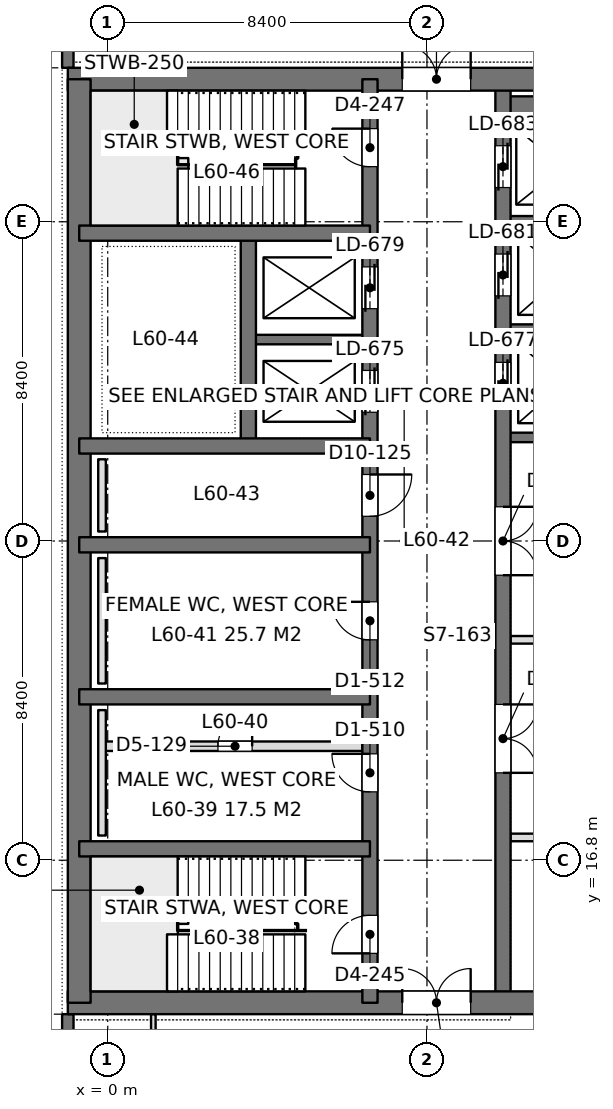
"""IFC4 building model, lengths in metres.
Left out: names, types, materials, properties, quantities, classifications, styles, units other than length and angle.
Written with IfcOpenShell. Run it as: python <this file> out.ifc"""

import sys

from ifc_helpers import new_model, si_unit, direction, frame, frame_2d, origin, place, context, subcontext, project, spatial, rectangle, extrude, element, fill, save


model = new_model("IFC4")
c1 = context("Model", 3, precision=1e-05, world=origin(), true_north=direction((0.0, 1.0)))
c2 = subcontext(c1, "Body", "Model", "MODEL_VIEW")
j1 = project(units=[si_unit("LENGTHUNIT", "METRE"), si_unit("PLANEANGLEUNIT", "RADIAN")], contexts=[c1])
p1 = place(None, origin())
s1 = spatial("IfcSite", under=j1, at=p1, CompositionType="ELEMENT")
p2 = place(p1, origin())
s2 = spatial("IfcBuilding", under=s1, at=p2, CompositionType="ELEMENT")
p3 = place(p2, frame((0.0, 0.0, 263.7)))
s3 = spatial("IfcBuildingStorey", under=s2, at=p3, CompositionType="ELEMENT", Elevation=263.7)
p4 = place(p3, frame((-1.05, 13.05, 0.0), z_axis=(0.0, 0.0, 1.0), x_axis=(1.0, 0.0, 0.0)))
e1 = element("IfcWall", 1, at=p4, inside=s3, PredefinedType="SHEAR", context=c2, shape_type="SweptSolid", body=[
    extrude(rectangle(XDim=17.7, YDim=0.6, at=frame_2d((8.85, 0.0))), origin(), (0.0, 0.0, 1.0), 4.5),
])
p5 = place(p4, frame((8.8, 0.0, 0.0)))
e2 = element("IfcOpeningElement", 2, at=p5, cuts=e1, PredefinedType="OPENING", context=c2, shape_type="SweptSolid", body=[
    extrude(rectangle(XDim=1.8, YDim=2.4, at=frame_2d((0.9, 1.2))), frame((0.0, 0.31, 0.0), z_axis=(0.0, -1.0, 0.0), x_axis=(1.0, 0.0, 0.0)), (0.0, 0.0, 1.0), 0.62),
])
p6 = place(p3, frame((-1.05, 37.35, 0.0), z_axis=(0.0, 0.0, 1.0), x_axis=(1.0, 0.0, 0.0)))
e3 = element("IfcWall", 3, at=p6, inside=s3, PredefinedType="SHEAR", context=c2, shape_type="SweptSolid", body=[
    extrude(rectangle(XDim=17.7, YDim=0.6, at=frame_2d((8.85, 0.0))), origin(), (0.0, 0.0, 1.0), 4.5),
])
p7 = place(p6, frame((8.8, 0.0, 0.0)))
e4 = element("IfcOpeningElement", 4, at=p7, cuts=e3, PredefinedType="OPENING", context=c2, shape_type="SweptSolid", body=[
    extrude(rectangle(XDim=1.8, YDim=2.4, at=frame_2d((0.9, 1.2))), frame((0.0, 0.31, 0.0), z_axis=(0.0, -1.0, 0.0), x_axis=(1.0, 0.0, 0.0)), (0.0, 0.0, 1.0), 0.62),
])
p8 = place(p3, frame((-0.75, 13.05, 0.0), z_axis=(0.0, 0.0, 1.0), x_axis=(0.0, 1.0, 0.0)))
e5 = element("IfcWall", 5, at=p8, inside=s3, PredefinedType="SHEAR", context=c2, shape_type="SweptSolid", body=[
    extrude(rectangle(XDim=24.3, YDim=0.6, at=frame_2d((12.15, 0.0))), origin(), (0.0, 0.0, 1.0), 4.5),
])
p9 = place(p3, frame((6.9, 13.05, 0.0), z_axis=(0.0, 0.0, 1.0), x_axis=(0.0, 1.0, 0.0)))
e6 = element("IfcWall", 6, at=p9, inside=s3, PredefinedType="SHEAR", context=c2, shape_type="SweptSolid", body=[
    extrude(rectangle(XDim=24.3, YDim=0.4, at=frame_2d((12.15, 0.0))), origin(), (0.0, 0.0, 1.0), 4.5),
])
p10 = place(p9, frame((1.3, 0.0, 0.0)))
e7 = element("IfcOpeningElement", 7, at=p10, cuts=e6, PredefinedType="OPENING", context=c2, shape_type="SweptSolid", body=[
    extrude(rectangle(XDim=1.0, YDim=2.2, at=frame_2d((0.5, 1.1))), frame((0.0, 0.21, 0.0), z_axis=(0.0, -1.0, 0.0), x_axis=(1.0, 0.0, 0.0)), (0.0, 0.0, 1.0), 0.42),
])
p11 = place(p9, frame((22.0, 0.0, 0.0)))
e8 = element("IfcOpeningElement", 8, at=p11, cuts=e6, PredefinedType="OPENING", context=c2, shape_type="SweptSolid", body=[
    extrude(rectangle(XDim=1.0, YDim=2.2, at=frame_2d((0.5, 1.1))), frame((0.0, 0.21, 0.0), z_axis=(0.0, -1.0, 0.0), x_axis=(1.0, 0.0, 0.0)), (0.0, 0.0, 1.0), 0.42),
])
p12 = place(p9, frame((5.55, 0.0, 0.0)))
e9 = element("IfcOpeningElement", 9, at=p12, cuts=e6, PredefinedType="OPENING", context=c2, shape_type="SweptSolid", body=[
    extrude(rectangle(XDim=1.0, YDim=2.2, at=frame_2d((0.5, 1.1))), frame((0.0, 0.21, 0.0), z_axis=(0.0, -1.0, 0.0), x_axis=(1.0, 0.0, 0.0)), (0.0, 0.0, 1.0), 0.42),
])
p13 = place(p9, frame((9.55, 0.0, 0.0)))
e10 = element("IfcOpeningElement", 10, at=p13, cuts=e6, PredefinedType="OPENING", context=c2, shape_type="SweptSolid", body=[
    extrude(rectangle(XDim=1.0, YDim=2.2, at=frame_2d((0.5, 1.1))), frame((0.0, 0.21, 0.0), z_axis=(0.0, -1.0, 0.0), x_axis=(1.0, 0.0, 0.0)), (0.0, 0.0, 1.0), 0.42),
])
p14 = place(p9, frame((12.8, 0.0, 0.0)))
e11 = element("IfcOpeningElement", 11, at=p14, cuts=e6, PredefinedType="OPENING", context=c2, shape_type="SweptSolid", body=[
    extrude(rectangle(XDim=1.1, YDim=2.2, at=frame_2d((0.55, 1.1))), frame((0.0, 0.21, 0.0), z_axis=(0.0, -1.0, 0.0), x_axis=(1.0, 0.0, 0.0)), (0.0, 0.0, 1.0), 0.42),
])
p15 = place(p9, frame((15.538, 0.0, 0.0)))
e12 = element("IfcOpeningElement", 12, at=p15, cuts=e6, PredefinedType="OPENING", context=c2, shape_type="SweptSolid", body=[
    extrude(rectangle(XDim=1.1, YDim=2.2, at=frame_2d((0.55, 1.1))), frame((0.0, 0.21, 0.0), z_axis=(0.0, -1.0, 0.0), x_axis=(1.0, 0.0, 0.0)), (0.0, 0.0, 1.0), 0.42),
])
p16 = place(p9, frame((18.262, 0.0, 0.0)))
e13 = element("IfcOpeningElement", 13, at=p16, cuts=e6, PredefinedType="OPENING", context=c2, shape_type="SweptSolid", body=[
    extrude(rectangle(XDim=1.1, YDim=2.2, at=frame_2d((0.55, 1.1))), frame((0.0, 0.21, 0.0), z_axis=(0.0, -1.0, 0.0), x_axis=(1.0, 0.0, 0.0)), (0.0, 0.0, 1.0), 0.42),
])
p17 = place(p3, frame((10.4, 13.05, 0.0), z_axis=(0.0, 0.0, 1.0), x_axis=(0.0, 1.0, 0.0)))
e14 = element("IfcWall", 14, at=p17, inside=s3, PredefinedType="SHEAR", context=c2, shape_type="SweptSolid", body=[
    extrude(rectangle(XDim=24.3, YDim=0.4, at=frame_2d((12.15, 0.0))), origin(), (0.0, 0.0, 1.0), 4.5),
])
p18 = place(p17, frame((15.75, 0.0, 0.0)))
e15 = element("IfcOpeningElement", 15, at=p18, cuts=e14, PredefinedType="OPENING", context=c2, shape_type="SweptSolid", body=[
    extrude(rectangle(XDim=1.1, YDim=2.2, at=frame_2d((0.55, 1.1))), frame((0.0, 0.21, 0.0), z_axis=(0.0, -1.0, 0.0), x_axis=(1.0, 0.0, 0.0)), (0.0, 0.0, 1.0), 0.42),
])
p19 = place(p17, frame((18.6, 0.0, 0.0)))
e16 = element("IfcOpeningElement", 16, at=p19, cuts=e14, PredefinedType="OPENING", context=c2, shape_type="SweptSolid", body=[
    extrude(rectangle(XDim=1.1, YDim=2.2, at=frame_2d((0.55, 1.1))), frame((0.0, 0.21, 0.0), z_axis=(0.0, -1.0, 0.0), x_axis=(1.0, 0.0, 0.0)), (0.0, 0.0, 1.0), 0.42),
])
p20 = place(p17, frame((21.45, 0.0, 0.0)))
e17 = element("IfcOpeningElement", 17, at=p20, cuts=e14, PredefinedType="OPENING", context=c2, shape_type="SweptSolid", body=[
    extrude(rectangle(XDim=1.1, YDim=2.2, at=frame_2d((0.55, 1.1))), frame((0.0, 0.21, 0.0), z_axis=(0.0, -1.0, 0.0), x_axis=(1.0, 0.0, 0.0)), (0.0, 0.0, 1.0), 0.42),
])
p21 = place(p17, frame((6.05, 0.0, 0.0)))
e18 = element("IfcOpeningElement", 18, at=p21, cuts=e14, PredefinedType="OPENING", context=c2, shape_type="SweptSolid", body=[
    extrude(rectangle(XDim=1.8, YDim=2.4, at=frame_2d((0.9, 1.2))), frame((0.0, 0.21, 0.0), z_axis=(0.0, -1.0, 0.0), x_axis=(1.0, 0.0, 0.0)), (0.0, 0.0, 1.0), 0.42),
])
p22 = place(p17, frame((11.25, 0.0, 0.0)))
e19 = element("IfcOpeningElement", 19, at=p22, cuts=e14, PredefinedType="OPENING", context=c2, shape_type="SweptSolid", body=[
    extrude(rectangle(XDim=1.8, YDim=2.4, at=frame_2d((0.9, 1.2))), frame((0.0, 0.21, 0.0), z_axis=(0.0, -1.0, 0.0), x_axis=(1.0, 0.0, 0.0)), (0.0, 0.0, 1.0), 0.42),
])
for number, where, z_axis, x_axis in (
    (20, (-0.75, 17.1, 0.0), (0.0, 0.0, 1.0), (1.0, 0.0, 0.0)),
    (21, (-0.75, 21.1, 0.0), (0.0, 0.0, 1.0), (1.0, 0.0, 0.0)),
    (22, (-0.75, 25.1, 0.0), (0.0, 0.0, 1.0), (1.0, 0.0, 0.0)),
    (23, (-0.75, 27.7, 0.0), (0.0, 0.0, 1.0), (1.0, 0.0, 0.0)),
    (24, (-0.75, 33.3, 0.0), (0.0, 0.0, 1.0), (1.0, 0.0, 0.0)),
):
    element("IfcWall", number, at=place(p3, frame(where, z_axis=z_axis, x_axis=x_axis)), inside=s3, PredefinedType="SHEAR", context=c2, shape_type="SweptSolid", body=[
        extrude(rectangle(XDim=7.65, YDim=0.4, at=frame_2d((3.825, 0.0))), origin(), (0.0, 0.0, 1.0), 4.5),
    ])
p23 = place(p3, frame((3.7, 27.7, 0.0), z_axis=(0.0, 0.0, 1.0), x_axis=(0.0, 1.0, 0.0)))
e25 = element("IfcWall", 25, at=p23, inside=s3, PredefinedType="SHEAR", context=c2, shape_type="SweptSolid", body=[
    extrude(rectangle(XDim=5.6, YDim=0.4, at=frame_2d((2.8, 0.0))), origin(), (0.0, 0.0, 1.0), 4.5),
])
p24 = place(p3, frame((3.7, 30.5, 0.0), z_axis=(0.0, 0.0, 1.0), x_axis=(1.0, 0.0, 0.0)))
e26 = element("IfcWall", 26, at=p24, inside=s3, PredefinedType="SHEAR", context=c2, shape_type="SweptSolid", body=[
    extrude(rectangle(XDim=3.2, YDim=0.25, at=frame_2d((1.6, 0.0))), origin(), (0.0, 0.0, 1.0), 4.5),
])
p25 = place(p3, frame((10.4, 27.925, 0.0), z_axis=(0.0, 0.0, 1.0), x_axis=(1.0, 0.0, 0.0)))
e27 = element("IfcWall", 27, at=p25, inside=s3, PredefinedType="SHEAR", context=c2, shape_type="SweptSolid", body=[
    extrude(rectangle(XDim=5.95, YDim=0.25, at=frame_2d((2.975, 0.0))), origin(), (0.0, 0.0, 1.0), 4.5),
])
for number, where, z_axis, x_axis in (
    (28, (10.4, 30.775, 0.0), (0.0, 0.0, 1.0), (1.0, 0.0, 0.0)),
    (29, (10.4, 33.625, 0.0), (0.0, 0.0, 1.0), (1.0, 0.0, 0.0)),
):
    element("IfcWall", number, at=place(p3, frame(where, z_axis=z_axis, x_axis=x_axis)), inside=s3, PredefinedType="SHEAR", context=c2, shape_type="SweptSolid", body=[
        extrude(rectangle(XDim=3.2, YDim=0.25, at=frame_2d((1.6, 0.0))), origin(), (0.0, 0.0, 1.0), 4.5),
    ])
p26 = place(p3, frame((10.4, 36.625, 0.0), z_axis=(0.0, 0.0, 1.0), x_axis=(1.0, 0.0, 0.0)))
e30 = element("IfcWall", 30, at=p26, inside=s3, PredefinedType="SHEAR", context=c2, shape_type="SweptSolid", body=[
    extrude(rectangle(XDim=3.2, YDim=0.55, at=frame_2d((1.6, 0.0))), origin(), (0.0, 0.0, 1.0), 4.5),
])
p27 = place(p3, frame((-1.05, 8.4, 0.0), z_axis=(0.0, 0.0, 1.0), x_axis=(0.0, 1.0, 0.0)))
e31 = element("IfcWall", 31, at=p27, inside=s3, PredefinedType="SOLIDWALL", context=c2, shape_type="SweptSolid", body=[
    extrude(rectangle(XDim=4.35, YDim=0.3, at=frame_2d((2.175, 0.0))), origin(), (0.0, 0.0, 1.0), 4.35),
])
p28 = place(p27, frame((0.975, 0.0, 0.9)))
e32 = element("IfcOpeningElement", 32, at=p28, cuts=e31, PredefinedType="OPENING", context=c2, shape_type="SweptSolid", body=[
    extrude(rectangle(XDim=2.4, YDim=1.9, at=frame_2d((1.2, 0.95))), frame((0.0, 0.16, 0.0), z_axis=(0.0, -1.0, 0.0), x_axis=(1.0, 0.0, 0.0)), (0.0, 0.0, 1.0), 0.32),
])
p29 = place(p3, frame((-1.05, 37.65, 0.0), z_axis=(0.0, 0.0, 1.0), x_axis=(0.0, 1.0, 0.0)))
e33 = element("IfcWall", 33, at=p29, inside=s3, PredefinedType="SOLIDWALL", context=c2, shape_type="SweptSolid", body=[
    extrude(rectangle(XDim=4.35, YDim=0.3, at=frame_2d((2.175, 0.0))), origin(), (0.0, 0.0, 1.0), 4.35),
])
p30 = place(p29, frame((0.975, 0.0, 0.9)))
e34 = element("IfcOpeningElement", 34, at=p30, cuts=e33, PredefinedType="OPENING", context=c2, shape_type="SweptSolid", body=[
    extrude(rectangle(XDim=2.4, YDim=1.9, at=frame_2d((1.2, 0.95))), frame((0.0, 0.16, 0.0), z_axis=(0.0, -1.0, 0.0), x_axis=(1.0, 0.0, 0.0)), (0.0, 0.0, 1.0), 0.32),
])
p31 = place(p3, frame((10.598, 17.4, 0.0), z_axis=(0.0, 0.0, 1.0), x_axis=(1.0, 0.0, 0.0)))
e35 = element("IfcWall", 35, at=p31, inside=s3, PredefinedType="PARTITIONING", context=c2, shape_type="SweptSolid", body=[
    extrude(rectangle(XDim=5.904, YDim=0.2, at=frame_2d((2.952, 0.0))), origin(), (0.0, 0.0, 1.0), 3.8),
])
p32 = place(p3, frame((10.598, 22.6, 0.0), z_axis=(0.0, 0.0, 1.0), x_axis=(1.0, 0.0, 0.0)))
e36 = element("IfcWall", 36, at=p32, inside=s3, PredefinedType="PARTITIONING", context=c2, shape_type="SweptSolid", body=[
    extrude(rectangle(XDim=5.053, YDim=0.2, at=frame_2d((2.526, 0.0))), origin(), (0.0, 0.0, 1.0), 4.35),
])
for number, where, z_axis, x_axis in (
    (37, (1.2, 10.4, 0.0), (0.0, 0.0, 1.0), (0.0, 1.0, 0.0)),
    (38, (1.2, 37.648, 0.0), (0.0, 0.0, 1.0), (0.0, 1.0, 0.0)),
):
    element("IfcWall", number, at=place(p3, frame(where, z_axis=z_axis, x_axis=x_axis)), inside=s3, PredefinedType="PARTITIONING", context=c2, shape_type="SweptSolid", body=[
        extrude(rectangle(XDim=2.352, YDim=0.12, at=frame_2d((1.176, 0.0))), origin(), (0.0, 0.0, 1.0), 4.35),
    ])
p33 = place(p3, frame((-0.05, 19.8, 0.0), z_axis=(0.0, 0.0, 1.0), x_axis=(1.0, 0.0, 0.0)))
e39 = element("IfcWall", 39, at=p33, inside=s3, PredefinedType="PARTITIONING", context=c2, shape_type="SweptSolid", body=[
    extrude(rectangle(XDim=6.75, YDim=0.25, at=frame_2d((3.375, 0.0))), origin(), (0.0, 0.0, 1.0), 4.3),
])
p34 = place(p33, frame((2.95, 0.0, 0.0)))
e40 = element("IfcOpeningElement", 40, at=p34, cuts=e39, PredefinedType="OPENING", context=c2, shape_type="SweptSolid", body=[
    extrude(rectangle(XDim=0.9, YDim=2.2, at=frame_2d((0.45, 1.1))), frame((0.0, 0.135, 0.0), z_axis=(0.0, -1.0, 0.0), x_axis=(1.0, 0.0, 0.0)), (0.0, 0.0, 1.0), 0.27),
])
for number, where, z_axis, x_axis in (
    (41, (-0.15, 17.45, 0.0), (0.0, 0.0, 1.0), (0.0, 1.0, 0.0)),
    (42, (-0.15, 21.45, 0.0), (0.0, 0.0, 1.0), (0.0, 1.0, 0.0)),
):
    element("IfcWall", number, at=place(p3, frame(where, z_axis=z_axis, x_axis=x_axis)), inside=s3, PredefinedType="PLUMBINGWALL", context=c2, shape_type="SweptSolid", body=[
        extrude(rectangle(XDim=3.3, YDim=0.2, at=frame_2d((1.65, 0.0))), origin(), (0.0, 0.0, 1.0), 1.2),
    ])
p35 = place(p3, frame((-0.15, 25.45, 0.0), z_axis=(0.0, 0.0, 1.0), x_axis=(0.0, 1.0, 0.0)))
e43 = element("IfcWall", 43, at=p35, inside=s3, PredefinedType="PLUMBINGWALL", context=c2, shape_type="SweptSolid", body=[
    extrude(rectangle(XDim=1.9, YDim=0.2, at=frame_2d((0.95, 0.0))), origin(), (0.0, 0.0, 1.0), 1.2),
])
p36 = place(p5, origin())
e44 = element("IfcDoor", 44, at=p36, inside=s3, OperationType="DOUBLE_DOOR_SINGLE_SWING", PredefinedType="DOOR", context=c2, shape_type="SweptSolid", body=[
    extrude(rectangle(XDim=1.8, YDim=2.4, at=frame_2d((0.9, 1.2))), frame((0.0, 0.025, 0.0), z_axis=(0.0, -1.0, 0.0), x_axis=(1.0, 0.0, 0.0)), (0.0, 0.0, 1.0), 0.05),
])
fill(e2, e44)
p37 = place(p7, origin())
e45 = element("IfcDoor", 45, at=p37, inside=s3, OperationType="DOUBLE_DOOR_SINGLE_SWING", PredefinedType="DOOR", context=c2, shape_type="SweptSolid", body=[
    extrude(rectangle(XDim=1.8, YDim=2.4, at=frame_2d((0.9, 1.2))), frame((0.0, 0.025, 0.0), z_axis=(0.0, -1.0, 0.0), x_axis=(1.0, 0.0, 0.0)), (0.0, 0.0, 1.0), 0.05),
])
fill(e4, e45)
p38 = place(p10, origin())
e46 = element("IfcDoor", 46, at=p38, inside=s3, OperationType="SINGLE_SWING_LEFT", PredefinedType="DOOR", context=c2, shape_type="SweptSolid", body=[
    extrude(rectangle(XDim=1.0, YDim=2.2, at=frame_2d((0.5, 1.1))), frame((0.0, 0.025, 0.0), z_axis=(0.0, -1.0, 0.0), x_axis=(1.0, 0.0, 0.0)), (0.0, 0.0, 1.0), 0.05),
])
fill(e7, e46)
p39 = place(p11, origin())
e47 = element("IfcDoor", 47, at=p39, inside=s3, OperationType="SINGLE_SWING_RIGHT", PredefinedType="DOOR", context=c2, shape_type="SweptSolid", body=[
    extrude(rectangle(XDim=1.0, YDim=2.2, at=frame_2d((0.5, 1.1))), frame((0.0, 0.025, 0.0), z_axis=(0.0, -1.0, 0.0), x_axis=(1.0, 0.0, 0.0)), (0.0, 0.0, 1.0), 0.05),
])
fill(e8, e47)
p40 = place(p12, origin())
e48 = element("IfcDoor", 48, at=p40, inside=s3, OperationType="SINGLE_SWING_RIGHT", PredefinedType="DOOR", context=c2, shape_type="SweptSolid", body=[
    extrude(rectangle(XDim=1.0, YDim=2.2, at=frame_2d((0.5, 1.1))), frame((0.0, 0.025, 0.0), z_axis=(0.0, -1.0, 0.0), x_axis=(1.0, 0.0, 0.0)), (0.0, 0.0, 1.0), 0.05),
])
fill(e9, e48)
p41 = place(p13, origin())
e49 = element("IfcDoor", 49, at=p41, inside=s3, OperationType="SINGLE_SWING_RIGHT", PredefinedType="DOOR", context=c2, shape_type="SweptSolid", body=[
    extrude(rectangle(XDim=1.0, YDim=2.2, at=frame_2d((0.5, 1.1))), frame((0.0, 0.025, 0.0), z_axis=(0.0, -1.0, 0.0), x_axis=(1.0, 0.0, 0.0)), (0.0, 0.0, 1.0), 0.05),
])
fill(e10, e49)
p42 = place(p14, frame((1.1, 0.0, 0.0), z_axis=(0.0, 0.0, 1.0), x_axis=(-1.0, 0.0, 0.0)))
e50 = element("IfcDoor", 50, at=p42, inside=s3, OperationType="SINGLE_SWING_LEFT", PredefinedType="DOOR", context=c2, shape_type="SweptSolid", body=[
    extrude(rectangle(XDim=1.1, YDim=2.2, at=frame_2d((0.55, 1.1))), frame((0.0, 0.025, 0.0), z_axis=(0.0, -1.0, 0.0), x_axis=(1.0, 0.0, 0.0)), (0.0, 0.0, 1.0), 0.05),
])
fill(e11, e50)
p43 = place(p18, origin())
e51 = element("IfcDoor", 51, at=p43, inside=s3, OperationType="DOUBLE_DOOR_SLIDING", PredefinedType="DOOR", context=c2, shape_type="SweptSolid", body=[
    extrude(rectangle(XDim=1.1, YDim=2.2, at=frame_2d((0.55, 1.1))), frame((0.0, 0.025, 0.0), z_axis=(0.0, -1.0, 0.0), x_axis=(1.0, 0.0, 0.0)), (0.0, 0.0, 1.0), 0.05),
])
fill(e15, e51)
p44 = place(p19, origin())
e52 = element("IfcDoor", 52, at=p44, inside=s3, OperationType="DOUBLE_DOOR_SLIDING", PredefinedType="DOOR", context=c2, shape_type="SweptSolid", body=[
    extrude(rectangle(XDim=1.1, YDim=2.2, at=frame_2d((0.55, 1.1))), frame((0.0, 0.025, 0.0), z_axis=(0.0, -1.0, 0.0), x_axis=(1.0, 0.0, 0.0)), (0.0, 0.0, 1.0), 0.05),
])
fill(e16, e52)
p45 = place(p20, origin())
e53 = element("IfcDoor", 53, at=p45, inside=s3, OperationType="DOUBLE_DOOR_SLIDING", PredefinedType="DOOR", context=c2, shape_type="SweptSolid", body=[
    extrude(rectangle(XDim=1.1, YDim=2.2, at=frame_2d((0.55, 1.1))), frame((0.0, 0.025, 0.0), z_axis=(0.0, -1.0, 0.0), x_axis=(1.0, 0.0, 0.0)), (0.0, 0.0, 1.0), 0.05),
])
fill(e17, e53)
p46 = place(p15, origin())
e54 = element("IfcDoor", 54, at=p46, inside=s3, OperationType="DOUBLE_DOOR_SLIDING", PredefinedType="DOOR", context=c2, shape_type="SweptSolid", body=[
    extrude(rectangle(XDim=1.1, YDim=2.2, at=frame_2d((0.55, 1.1))), frame((0.0, 0.025, 0.0), z_axis=(0.0, -1.0, 0.0), x_axis=(1.0, 0.0, 0.0)), (0.0, 0.0, 1.0), 0.05),
])
fill(e12, e54)
p47 = place(p16, origin())
e55 = element("IfcDoor", 55, at=p47, inside=s3, OperationType="DOUBLE_DOOR_SLIDING", PredefinedType="DOOR", context=c2, shape_type="SweptSolid", body=[
    extrude(rectangle(XDim=1.1, YDim=2.2, at=frame_2d((0.55, 1.1))), frame((0.0, 0.025, 0.0), z_axis=(0.0, -1.0, 0.0), x_axis=(1.0, 0.0, 0.0)), (0.0, 0.0, 1.0), 0.05),
])
fill(e13, e55)
p48 = place(p21, frame((1.8, 0.0, 0.0), z_axis=(0.0, 0.0, 1.0), x_axis=(-1.0, 0.0, 0.0)))
e56 = element("IfcDoor", 56, at=p48, inside=s3, OperationType="DOUBLE_DOOR_SINGLE_SWING", PredefinedType="DOOR", context=c2, shape_type="SweptSolid", body=[
    extrude(rectangle(XDim=1.8, YDim=2.4, at=frame_2d((0.9, 1.2))), frame((0.0, 0.025, 0.0), z_axis=(0.0, -1.0, 0.0), x_axis=(1.0, 0.0, 0.0)), (0.0, 0.0, 1.0), 0.05),
])
fill(e18, e56)
p49 = place(p22, frame((1.8, 0.0, 0.0), z_axis=(0.0, 0.0, 1.0), x_axis=(-1.0, 0.0, 0.0)))
e57 = element("IfcDoor", 57, at=p49, inside=s3, OperationType="DOUBLE_DOOR_SINGLE_SWING", PredefinedType="DOOR", context=c2, shape_type="SweptSolid", body=[
    extrude(rectangle(XDim=1.8, YDim=2.4, at=frame_2d((0.9, 1.2))), frame((0.0, 0.025, 0.0), z_axis=(0.0, -1.0, 0.0), x_axis=(1.0, 0.0, 0.0)), (0.0, 0.0, 1.0), 0.05),
])
fill(e19, e57)
p50 = place(p34, origin())
e58 = element("IfcDoor", 58, at=p50, inside=s3, OperationType="SINGLE_SWING_RIGHT", PredefinedType="DOOR", context=c2, shape_type="SweptSolid", body=[
    extrude(rectangle(XDim=0.9, YDim=2.2, at=frame_2d((0.45, 1.1))), frame((0.0, 0.025, 0.0), z_axis=(0.0, -1.0, 0.0), x_axis=(1.0, 0.0, 0.0)), (0.0, 0.0, 1.0), 0.05),
])
fill(e40, e58)
save(model, sys.argv[1])
